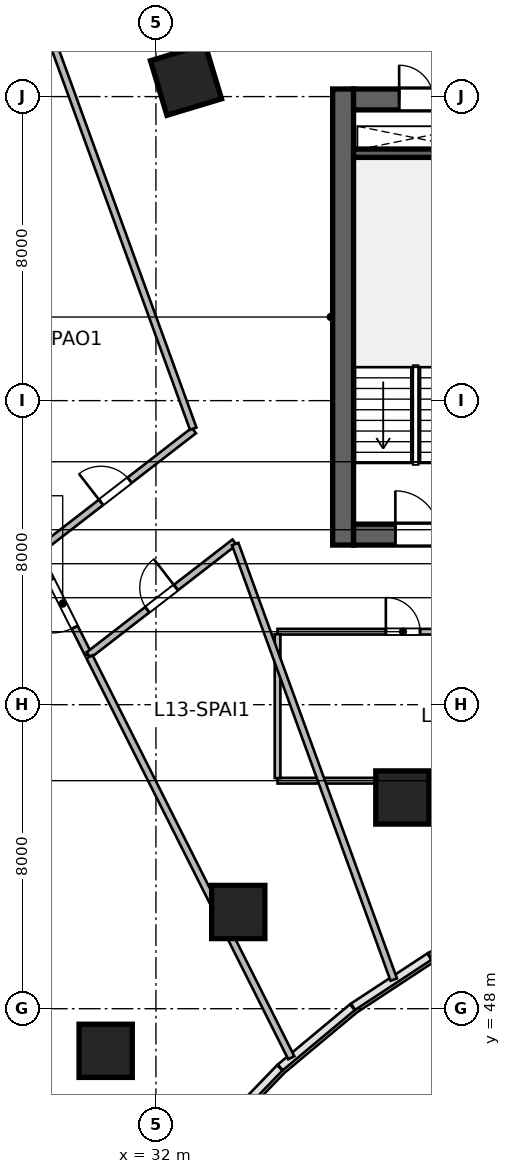
"""IFC4 building model, lengths in metres.
Left out: names, types, materials, properties, quantities, classifications, styles, units other than length and angle.
Written with IfcOpenShell. Run it as: python <this file> out.ifc"""

import sys

from ifc_helpers import new_model, si_unit, direction, frame, frame_2d, origin, origin_2d, place, context, subcontext, project, spatial, rectangle, circle, extrude, source, transform, mapped, element, fill, save


model = new_model("IFC4")
c1 = context("Model", 3, precision=1e-05, world=origin(), true_north=direction((0.0, 1.0)))
c2 = subcontext(c1, "Body", "Model", "MODEL_VIEW")
j1 = project(units=[si_unit("LENGTHUNIT", "METRE"), si_unit("PLANEANGLEUNIT", "RADIAN")], contexts=[c1])
p1 = place(None, origin())
s1 = spatial("IfcSite", under=j1, at=p1, CompositionType="ELEMENT")
p2 = place(p1, origin())
s2 = spatial("IfcBuilding", under=s1, at=p2, CompositionType="ELEMENT")
p3 = place(p2, frame((0.0, 0.0, 60.6)))
s3 = spatial("IfcBuildingStorey", under=s2, at=p3, CompositionType="ELEMENT", Elevation=60.6)
m1 = source(origin(), c2, "Body", "SweptSolid", [
    extrude(rectangle(XDim=12.0, YDim=0.55, at=frame_2d((6.0, 0.0))), origin(), (0.0, 0.0, 1.0), 3.6),
])
p4 = place(p3, frame((36.925, 60.2, 0.0), z_axis=(0.0, 0.0, 1.0), x_axis=(0.0, 1.0, 0.0)))
e1 = element("IfcWall", 1, at=p4, inside=s3, PredefinedType="SHEAR", context=c2, shape_type="MappedRepresentation", body=[
    mapped(m1, transform((0.0, 0.0, 0.0), scale=1.0)),
])
m2 = source(origin(), c2, "Body", "SweptSolid", [
    extrude(rectangle(XDim=21.6, YDim=0.55, at=frame_2d((10.8, 0.0))), origin(), (0.0, 0.0, 1.0), 3.6),
])
p5 = place(p3, frame((37.2, 60.475, 0.0), z_axis=(0.0, 0.0, 1.0), x_axis=(1.0, 0.0, 0.0)))
e2 = element("IfcWall", 2, at=p5, inside=s3, PredefinedType="SHEAR", context=c2, shape_type="MappedRepresentation", body=[
    mapped(m2, transform((0.0, 0.0, 0.0), scale=1.0)),
])
p6 = place(p5, frame((1.1, 0.0, 0.0)))
e3 = element("IfcOpeningElement", 3, at=p6, cuts=e2, PredefinedType="OPENING", context=c2, shape_type="SweptSolid", body=[
    extrude(rectangle(XDim=1.15, YDim=2.15, at=frame_2d((0.575, 1.075))), frame((0.0, 0.285, 0.0), z_axis=(0.0, -1.0, 0.0), x_axis=(1.0, 0.0, 0.0)), (0.0, 0.0, 1.0), 0.57),
])
p7 = place(p5, frame((19.5, 0.0, 0.0)))
e4 = element("IfcOpeningElement", 4, at=p7, cuts=e2, PredefinedType="OPENING", context=c2, shape_type="SweptSolid", body=[
    extrude(rectangle(XDim=0.9, YDim=2.1, at=frame_2d((0.45, 1.05))), frame((0.0, 0.285, 0.0), z_axis=(0.0, -1.0, 0.0), x_axis=(1.0, 0.0, 0.0)), (0.0, 0.0, 1.0), 0.57),
])
p8 = place(p5, frame((12.02, 0.0, 0.0)))
e5 = element("IfcOpeningElement", 5, at=p8, cuts=e2, PredefinedType="OPENING", context=c2, shape_type="SweptSolid", body=[
    extrude(rectangle(XDim=1.6, YDim=2.15, at=frame_2d((0.8, 1.075))), frame((0.0, 0.285, 0.0), z_axis=(0.0, -1.0, 0.0), x_axis=(1.0, 0.0, 0.0)), (0.0, 0.0, 1.0), 0.57),
])
p9 = place(p3, frame((37.2, 71.925, 0.0), z_axis=(0.0, 0.0, 1.0), x_axis=(1.0, 0.0, 0.0)))
e6 = element("IfcWall", 6, at=p9, inside=s3, PredefinedType="SHEAR", context=c2, shape_type="MappedRepresentation", body=[
    mapped(m2, transform((0.0, 0.0, 0.0), scale=1.0)),
])
p10 = place(p9, frame((1.2, 0.0, 0.0)))
e7 = element("IfcOpeningElement", 7, at=p10, cuts=e6, PredefinedType="OPENING", context=c2, shape_type="SweptSolid", body=[
    extrude(rectangle(XDim=0.9, YDim=2.1, at=frame_2d((0.45, 1.05))), frame((0.0, 0.285, 0.0), z_axis=(0.0, -1.0, 0.0), x_axis=(1.0, 0.0, 0.0)), (0.0, 0.0, 1.0), 0.57),
])
p11 = place(p9, frame((14.7, 0.0, 0.0)))
e8 = element("IfcOpeningElement", 8, at=p11, cuts=e6, PredefinedType="OPENING", context=c2, shape_type="SweptSolid", body=[
    extrude(rectangle(XDim=1.2, YDim=2.15, at=frame_2d((0.6, 1.075))), frame((0.0, 0.285, 0.0), z_axis=(0.0, -1.0, 0.0), x_axis=(1.0, 0.0, 0.0)), (0.0, 0.0, 1.0), 0.57),
])
p12 = place(p9, frame((4.15, 0.0, 0.0)))
e9 = element("IfcOpeningElement", 9, at=p12, cuts=e6, PredefinedType="OPENING", context=c2, shape_type="SweptSolid", body=[
    extrude(rectangle(XDim=1.3, YDim=2.15, at=frame_2d((0.65, 1.075))), frame((0.0, 0.285, 0.0), z_axis=(0.0, -1.0, 0.0), x_axis=(1.0, 0.0, 0.0)), (0.0, 0.0, 1.0), 0.57),
])
p13 = place(p9, frame((7.25, 0.0, 0.0)))
e10 = element("IfcOpeningElement", 10, at=p13, cuts=e6, PredefinedType="OPENING", context=c2, shape_type="SweptSolid", body=[
    extrude(rectangle(XDim=0.9, YDim=2.1, at=frame_2d((0.45, 1.05))), frame((0.0, 0.285, 0.0), z_axis=(0.0, -1.0, 0.0), x_axis=(1.0, 0.0, 0.0)), (0.0, 0.0, 1.0), 0.57),
])
m3 = source(origin(), c2, "Body", "SweptSolid", [
    extrude(rectangle(XDim=3.27, YDim=0.22, at=frame_2d((1.635, 0.0))), origin(), (0.0, 0.0, 1.0), 3.6),
])
p14 = place(p3, frame((37.2, 70.51, 0.0), z_axis=(0.0, 0.0, 1.0), x_axis=(1.0, 0.0, 0.0)))
e11 = element("IfcWall", 11, at=p14, inside=s3, PredefinedType="SHEAR", context=c2, shape_type="MappedRepresentation", body=[
    mapped(m3, transform((0.0, 0.0, 0.0), scale=1.0)),
])
m4 = source(origin(), c2, "Body", "SweptSolid", [
    extrude(circle(Radius=0.7, at=origin_2d()), origin(), (0.0, 0.0, 1.0), 3.6),
])
for number, where, z_axis, x_axis in (
    (12, (30.677, 46.892, 0.0), (0.0, 0.0, 1.0), (-0.571, 0.821, 0.0)),
    (13, (34.166, 50.545, 0.0), (0.0, 0.0, 1.0), (-0.436, 0.9, 0.0)),
    (14, (38.485, 53.558, 0.0), (0.0, 0.0, 1.0), (-0.289, 0.957, 0.0)),
):
    element("IfcColumn", number, at=place(p3, frame(where, z_axis=z_axis, x_axis=x_axis)), inside=s3, PredefinedType="COLUMN", context=c2, shape_type="MappedRepresentation", body=[
        mapped(m4, transform((0.0, 0.0, 0.0), scale=1.0)),
    ])
m5 = source(origin(), c2, "Body", "SweptSolid", [
    extrude(rectangle(XDim=1.5, YDim=1.5, at=origin_2d()), origin(), (0.0, 0.0, 1.0), 3.6),
])
p15 = place(p3, frame((32.791, 72.442, 0.0), z_axis=(0.0, 0.0, 1.0), x_axis=(-0.288697611798, 0.957420330337, 0.0)))
e15 = element("IfcColumn", 15, at=p15, inside=s3, PredefinedType="COLUMN", context=c2, shape_type="MappedRepresentation", body=[
    mapped(m5, transform((0.0, 0.0, 0.0), scale=1.0)),
])
m6 = source(origin(), c2, "Body", "SweptSolid", [
    extrude(rectangle(XDim=6.6, YDim=0.15, at=frame_2d((3.3, 0.0))), origin(), (0.0, 0.0, 1.0), 2.803),
])
p16 = place(p3, frame((35.2, 54.0, 0.0), z_axis=(0.0, 0.0, 1.0), x_axis=(1.0, 0.0, 0.0)))
e16 = element("IfcWall", 16, at=p16, inside=s3, PredefinedType="PARTITIONING", context=c2, shape_type="MappedRepresentation", body=[
    mapped(m6, transform((0.0, 0.0, 0.0), scale=1.0)),
])
m7 = source(origin(), c2, "Body", "SweptSolid", [
    extrude(rectangle(XDim=6.6, YDim=0.15, at=frame_2d((3.3, 0.0))), origin(), (0.0, 0.0, 1.0), 3.36),
])
p17 = place(p3, frame((35.2, 57.92, 0.0), z_axis=(0.0, 0.0, 1.0), x_axis=(1.0, 0.0, 0.0)))
e17 = element("IfcWall", 17, at=p17, inside=s3, PredefinedType="PARTITIONING", context=c2, shape_type="MappedRepresentation", body=[
    mapped(m7, transform((0.0, 0.0, 0.0), scale=1.0)),
])
p18 = place(p17, frame((2.85, 0.0, 0.0)))
e18 = element("IfcOpeningElement", 18, at=p18, cuts=e17, PredefinedType="OPENING", context=c2, shape_type="SweptSolid", body=[
    extrude(rectangle(XDim=0.9, YDim=2.1, at=frame_2d((0.45, 1.05))), frame((0.0, 0.085, 0.0), z_axis=(0.0, -1.0, 0.0), x_axis=(1.0, 0.0, 0.0)), (0.0, 0.0, 1.0), 0.17),
])
m8 = source(origin(), c2, "Body", "SweptSolid", [
    extrude(rectangle(XDim=3.785, YDim=0.15, at=frame_2d((1.893, 0.0))), origin(), (0.0, 0.0, 1.0), 3.36),
])
p19 = place(p3, frame((35.2, 54.067, 0.0), z_axis=(0.0, 0.0, 1.0), x_axis=(0.0, 1.0, 0.0)))
e19 = element("IfcWall", 19, at=p19, inside=s3, PredefinedType="PARTITIONING", context=c2, shape_type="MappedRepresentation", body=[
    mapped(m8, transform((0.0, 0.0, 0.0), scale=1.0)),
])
m9 = source(origin(), c2, "Body", "SweptSolid", [
    extrude(rectangle(XDim=2.985, YDim=0.18, at=frame_2d((1.493, 0.0))), origin(), (0.0, 0.0, 1.0), 3.36),
])
p20 = place(p3, frame((30.218, 57.327, 0.0), z_axis=(0.0, 0.0, 1.0), x_axis=(-0.449665526069, 0.893197018952, 0.0)))
e20 = element("IfcWall", 20, at=p20, inside=s3, PredefinedType="PLUMBINGWALL", context=c2, shape_type="MappedRepresentation", body=[
    mapped(m9, transform((0.0, 0.0, 0.0), scale=1.0)),
])
p21 = place(p20, frame((0.792, 0.0, 0.0)))
e21 = element("IfcOpeningElement", 21, at=p21, cuts=e20, PredefinedType="OPENING", context=c2, shape_type="SweptSolid", body=[
    extrude(rectangle(XDim=1.4, YDim=2.15, at=frame_2d((0.7, 1.075))), frame((0.0, 0.1, 0.0), z_axis=(0.0, -1.0, 0.0), x_axis=(1.0, 0.0, 0.0)), (0.0, 0.0, 1.0), 0.2),
])
m10 = source(origin(), c2, "Body", "SweptSolid", [
    extrude(rectangle(XDim=5.227, YDim=0.18, at=frame_2d((2.614, 0.0))), origin(), (0.0, 0.0, 1.0), 3.36),
])
p22 = place(p3, frame((28.865, 60.015, 0.0), z_axis=(0.0, 0.0, 1.0), x_axis=(0.790908912792, 0.61193389485, 0.0)))
e22 = element("IfcWall", 22, at=p22, inside=s3, PredefinedType="PLUMBINGWALL", context=c2, shape_type="MappedRepresentation", body=[
    mapped(m10, transform((0.0, 0.0, 0.0), scale=1.0)),
])
p23 = place(p22, frame((2.139, 0.0, 0.0)))
e23 = element("IfcOpeningElement", 23, at=p23, cuts=e22, PredefinedType="OPENING", context=c2, shape_type="SweptSolid", body=[
    extrude(rectangle(XDim=0.95, YDim=2.1, at=frame_2d((0.475, 1.05))), frame((0.0, 0.1, 0.0), z_axis=(0.0, -1.0, 0.0), x_axis=(1.0, 0.0, 0.0)), (0.0, 0.0, 1.0), 0.2),
])
m11 = source(origin(), c2, "Body", "SweptSolid", [
    extrude(rectangle(XDim=12.088, YDim=0.18, at=frame_2d((6.044, 0.0))), origin(), (0.0, 0.0, 1.0), 3.36),
])
p24 = place(p3, frame((32.981, 63.262, 0.0), z_axis=(0.0, 0.0, 1.0), x_axis=(-0.34203007529, 0.939689005787, 0.0)))
e24 = element("IfcWall", 24, at=p24, inside=s3, PredefinedType="PLUMBINGWALL", context=c2, shape_type="MappedRepresentation", body=[
    mapped(m11, transform((0.0, 0.0, 0.0), scale=1.0)),
])
m12 = source(origin(), c2, "Body", "SweptSolid", [
    extrude(rectangle(XDim=4.855, YDim=0.18, at=frame_2d((2.427, 0.0))), origin(), (0.0, 0.0, 1.0), 3.36),
])
p25 = place(p3, frame((30.229, 57.305, 0.0), z_axis=(0.0, 0.0, 1.0), x_axis=(0.790930965655, 0.611905391028, 0.0)))
e25 = element("IfcWall", 25, at=p25, inside=s3, PredefinedType="PLUMBINGWALL", context=c2, shape_type="MappedRepresentation", body=[
    mapped(m12, transform((0.0, 0.0, 0.0), scale=1.0)),
])
p26 = place(p25, frame((1.952, 0.0, 0.0)))
e26 = element("IfcOpeningElement", 26, at=p26, cuts=e25, PredefinedType="OPENING", context=c2, shape_type="SweptSolid", body=[
    extrude(rectangle(XDim=0.95, YDim=2.1, at=frame_2d((0.475, 1.05))), frame((0.0, 0.1, 0.0), z_axis=(0.0, -1.0, 0.0), x_axis=(1.0, 0.0, 0.0)), (0.0, 0.0, 1.0), 0.2),
])
m13 = source(origin(), c2, "Body", "SweptSolid", [
    extrude(rectangle(XDim=11.811, YDim=0.18, at=frame_2d((5.906, 0.0))), origin(), (0.0, 0.0, 1.0), 3.36),
])
p27 = place(p3, frame((35.562, 46.71, 0.0), z_axis=(0.0, 0.0, 1.0), x_axis=(-0.449626289102, 0.893216771086, 0.0)))
e27 = element("IfcWall", 27, at=p27, inside=s3, PredefinedType="PLUMBINGWALL", context=c2, shape_type="MappedRepresentation", body=[
    mapped(m13, transform((0.0, 0.0, 0.0), scale=1.0)),
])
m14 = source(origin(), c2, "Body", "SweptSolid", [
    extrude(rectangle(XDim=12.196, YDim=0.18, at=frame_2d((6.098, 0.0))), origin(), (0.0, 0.0, 1.0), 3.36),
])
p28 = place(p3, frame((38.258, 48.766, 0.0), z_axis=(0.0, 0.0, 1.0), x_axis=(-0.342022711534, 0.939691686031, 0.0)))
e28 = element("IfcWall", 28, at=p28, inside=s3, PredefinedType="PLUMBINGWALL", context=c2, shape_type="MappedRepresentation", body=[
    mapped(m14, transform((0.0, 0.0, 0.0), scale=1.0)),
])
m15 = source(origin(), c2, "Body", "SweptSolid", [
    extrude(rectangle(XDim=1.15, YDim=2.15, at=frame_2d((0.575, 1.075))), frame((0.0, 0.025, 0.0), z_axis=(0.0, -1.0, 0.0), x_axis=(1.0, 0.0, 0.0)), (0.0, 0.0, 1.0), 0.05),
])
p29 = place(p6, origin())
e29 = element("IfcDoor", 29, at=p29, inside=s3, OperationType="SINGLE_SWING_LEFT", PredefinedType="DOOR", context=c2, shape_type="MappedRepresentation", body=[
    mapped(m15, transform((0.0, 0.0, 0.0), scale=1.0)),
])
fill(e3, e29)
m16 = source(origin(), c2, "Body", "SweptSolid", [
    extrude(rectangle(XDim=0.9, YDim=2.1, at=frame_2d((0.45, 1.05))), frame((0.0, 0.025, 0.0), z_axis=(0.0, -1.0, 0.0), x_axis=(1.0, 0.0, 0.0)), (0.0, 0.0, 1.0), 0.05),
])
p30 = place(p10, origin())
e30 = element("IfcDoor", 30, at=p30, inside=s3, OperationType="SINGLE_SWING_LEFT", PredefinedType="DOOR", context=c2, shape_type="MappedRepresentation", body=[
    mapped(m16, transform((0.0, 0.0, 0.0), scale=1.0)),
])
fill(e7, e30)
p31 = place(p18, origin())
e31 = element("IfcDoor", 31, at=p31, inside=s3, OperationType="SINGLE_SWING_LEFT", PredefinedType="DOOR", context=c2, shape_type="MappedRepresentation", body=[
    mapped(m16, transform((0.0, 0.0, 0.0), scale=1.0)),
])
fill(e18, e31)
m17 = source(origin(), c2, "Body", "SweptSolid", [
    extrude(rectangle(XDim=1.4, YDim=2.15, at=frame_2d((0.7, 1.075))), frame((0.0, 0.025, 0.0), z_axis=(0.0, -1.0, 0.0), x_axis=(1.0, 0.0, 0.0)), (0.0, 0.0, 1.0), 0.05),
])
p32 = place(p21, origin())
e32 = element("IfcDoor", 32, at=p32, inside=s3, OperationType="SINGLE_SWING_RIGHT", PredefinedType="DOOR", context=c2, shape_type="MappedRepresentation", body=[
    mapped(m17, transform((0.0, 0.0, 0.0), scale=1.0)),
])
fill(e21, e32)
m18 = source(origin(), c2, "Body", "SweptSolid", [
    extrude(rectangle(XDim=0.95, YDim=2.1, at=frame_2d((0.475, 1.05))), frame((0.0, 0.025, 0.0), z_axis=(0.0, -1.0, 0.0), x_axis=(1.0, 0.0, 0.0)), (0.0, 0.0, 1.0), 0.05),
])
p33 = place(p23, origin())
e33 = element("IfcDoor", 33, at=p33, inside=s3, OperationType="SINGLE_SWING_LEFT", PredefinedType="DOOR", context=c2, shape_type="MappedRepresentation", body=[
    mapped(m18, transform((0.0, 0.0, 0.0), scale=1.0)),
])
fill(e23, e33)
p34 = place(p26, origin())
e34 = element("IfcDoor", 34, at=p34, inside=s3, OperationType="SINGLE_SWING_RIGHT", PredefinedType="DOOR", context=c2, shape_type="MappedRepresentation", body=[
    mapped(m18, transform((0.0, 0.0, 0.0), scale=1.0)),
])
fill(e26, e34)
save(model, sys.argv[1])
